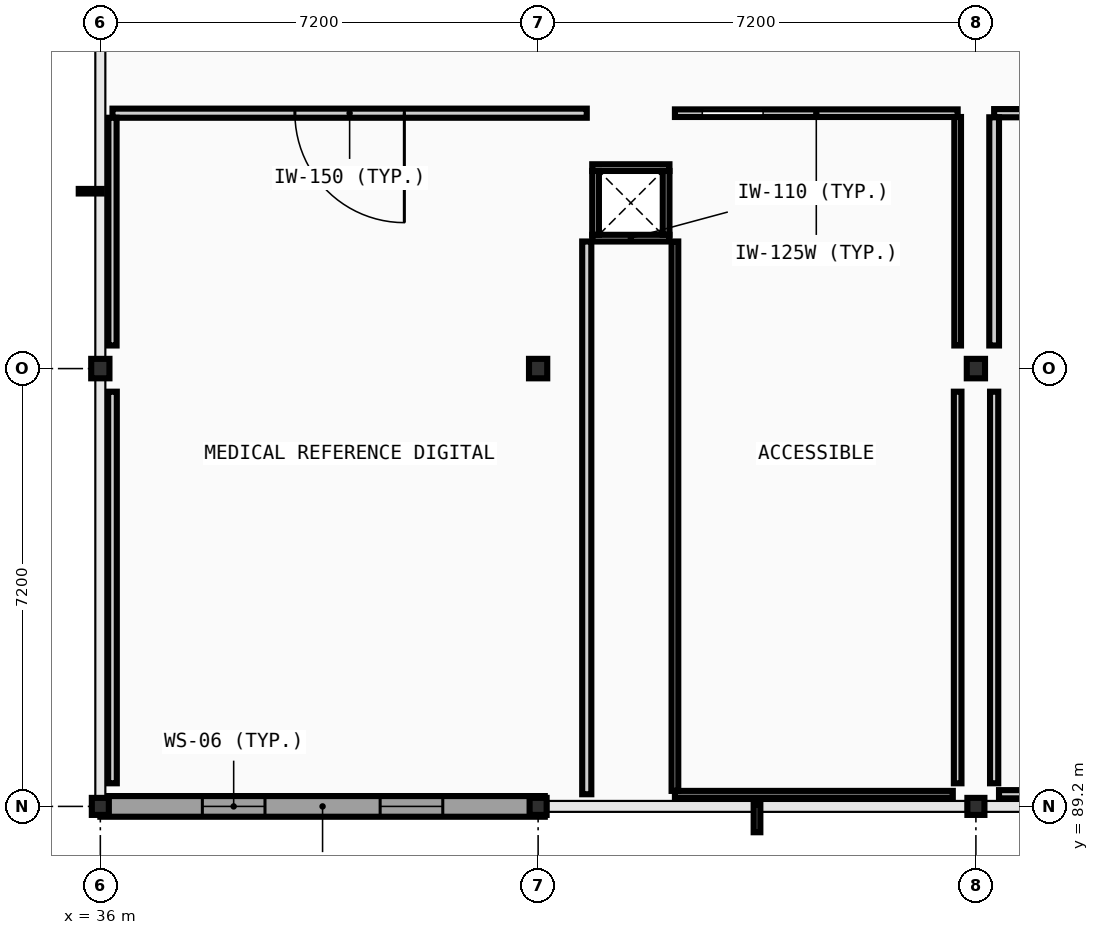
"""IFC4 building model, lengths in metres.
Left out: names, types, materials, properties, quantities, classifications, styles, units other than length and angle.
Written with IfcOpenShell. Run it as: python <this file> out.ifc"""

import sys

from ifc_helpers import new_model, si_unit, direction, frame, frame_2d, origin, origin_2d, place, context, subcontext, project, spatial, rectangle, i_section, extrude, element, fill, save


model = new_model("IFC4")
c1 = context("Model", 3, precision=1e-05, world=origin(), true_north=direction((0.0, 1.0)))
c2 = subcontext(c1, "Body", "Model", "MODEL_VIEW")
j1 = project(units=[si_unit("LENGTHUNIT", "METRE"), si_unit("PLANEANGLEUNIT", "RADIAN")], contexts=[c1])
p1 = place(None, origin())
s1 = spatial("IfcSite", under=j1, at=p1, CompositionType="ELEMENT")
p2 = place(p1, origin())
s2 = spatial("IfcBuilding", under=s1, at=p2, CompositionType="ELEMENT")
p3 = place(p2, frame((0.0, 0.0, 18.4)))
s3 = spatial("IfcBuildingStorey", under=s2, at=p3, CompositionType="ELEMENT", Elevation=18.4)
p4 = place(p3, frame((36.0, 89.2, 0.0), z_axis=(0.0, 0.0, 1.0), x_axis=(1.0, 0.0, 0.0)))
e1 = element("IfcColumn", 1, at=p4, inside=s3, PredefinedType="COLUMN", context=c2, shape_type="SweptSolid", body=[
    extrude(i_section(OverallWidth=0.28, OverallDepth=0.28, WebThickness=0.01, FlangeThickness=0.018, FilletRadius=0.024, at=origin_2d()), origin(), (0.0, 0.0, 1.0), 4.4),
])
p5 = place(p3, frame((36.0, 96.4, 0.0), z_axis=(0.0, 0.0, 1.0), x_axis=(1.0, 0.0, 0.0)))
e2 = element("IfcColumn", 2, at=p5, inside=s3, PredefinedType="COLUMN", context=c2, shape_type="SweptSolid", body=[
    extrude(i_section(OverallWidth=0.3, OverallDepth=0.32, WebThickness=0.011, FlangeThickness=0.021, FilletRadius=0.027, at=origin_2d()), origin(), (0.0, 0.0, 1.0), 4.4),
])
p6 = place(p3, frame((43.2, 89.2, 0.0), z_axis=(0.0, 0.0, 1.0), x_axis=(1.0, 0.0, 0.0)))
e3 = element("IfcColumn", 3, at=p6, inside=s3, PredefinedType="COLUMN", context=c2, shape_type="SweptSolid", body=[
    extrude(i_section(OverallWidth=0.28, OverallDepth=0.28, WebThickness=0.01, FlangeThickness=0.018, FilletRadius=0.024, at=origin_2d()), origin(), (0.0, 0.0, 1.0), 4.4),
])
p7 = place(p3, frame((43.2, 96.4, 0.0), z_axis=(0.0, 0.0, 1.0), x_axis=(1.0, 0.0, 0.0)))
e4 = element("IfcColumn", 4, at=p7, inside=s3, PredefinedType="COLUMN", context=c2, shape_type="SweptSolid", body=[
    extrude(i_section(OverallWidth=0.3, OverallDepth=0.32, WebThickness=0.011, FlangeThickness=0.021, FilletRadius=0.027, at=origin_2d()), origin(), (0.0, 0.0, 1.0), 4.4),
])
p8 = place(p3, frame((50.4, 89.2, 0.0), z_axis=(0.0, 0.0, 1.0), x_axis=(1.0, 0.0, 0.0)))
e5 = element("IfcColumn", 5, at=p8, inside=s3, PredefinedType="COLUMN", context=c2, shape_type="SweptSolid", body=[
    extrude(i_section(OverallWidth=0.28, OverallDepth=0.28, WebThickness=0.01, FlangeThickness=0.018, FilletRadius=0.024, at=origin_2d()), origin(), (0.0, 0.0, 1.0), 4.4),
])
p9 = place(p3, frame((50.4, 96.4, 0.0), z_axis=(0.0, 0.0, 1.0), x_axis=(1.0, 0.0, 0.0)))
e6 = element("IfcColumn", 6, at=p9, inside=s3, PredefinedType="COLUMN", context=c2, shape_type="SweptSolid", body=[
    extrude(i_section(OverallWidth=0.3, OverallDepth=0.32, WebThickness=0.011, FlangeThickness=0.021, FilletRadius=0.027, at=origin_2d()), origin(), (0.0, 0.0, 1.0), 4.4),
])
p10 = place(p3, frame((36.0, 89.2, 0.0), z_axis=(0.0, 0.0, 1.0), x_axis=(1.0, 0.0, 0.0)))
e7 = element("IfcWall", 7, at=p10, inside=s3, PredefinedType="STANDARD", context=c2, shape_type="SweptSolid", body=[
    extrude(rectangle(XDim=7.31, YDim=0.34, at=frame_2d((3.655, 0.0))), origin(), (0.0, 0.0, 1.0), 3.94),
])
p11 = place(p10, frame((1.678, 0.0, 0.95)))
e8 = element("IfcOpeningElement", 8, at=p11, cuts=e7, PredefinedType="OPENING", context=c2, shape_type="SweptSolid", body=[
    extrude(rectangle(XDim=1.03, YDim=1.26, at=frame_2d((0.515, 0.63))), frame((0.0, 0.18, 0.0), z_axis=(0.0, -1.0, 0.0), x_axis=(1.0, 0.0, 0.0)), (0.0, 0.0, 1.0), 0.36),
])
p12 = place(p10, frame((4.602, 0.0, 0.95)))
e9 = element("IfcOpeningElement", 9, at=p12, cuts=e7, PredefinedType="OPENING", context=c2, shape_type="SweptSolid", body=[
    extrude(rectangle(XDim=1.03, YDim=1.26, at=frame_2d((0.515, 0.63))), frame((0.0, 0.18, 0.0), z_axis=(0.0, -1.0, 0.0), x_axis=(1.0, 0.0, 0.0)), (0.0, 0.0, 1.0), 0.36),
])
for number, where, z_axis, x_axis in (
    (10, (44.09, 98.545, 0.0), (0.0, 0.0, 1.0), (1.0, 0.0, 0.0)),
    (11, (44.09, 99.705, 0.0), (0.0, 0.0, 1.0), (1.0, 0.0, 0.0)),
):
    element("IfcWall", number, at=place(p3, frame(where, z_axis=z_axis, x_axis=x_axis)), inside=s3, PredefinedType="PARTITIONING", context=c2, shape_type="SweptSolid", body=[
        extrude(rectangle(XDim=1.27, YDim=0.11, at=frame_2d((0.635, 0.0))), origin(), (0.0, 0.0, 1.0), 4.215),
    ])
for number, where, z_axis, x_axis in (
    (12, (44.145, 98.6, 0.0), (0.0, 0.0, 1.0), (0.0, 1.0, 0.0)),
    (13, (45.305, 98.6, 0.0), (0.0, 0.0, 1.0), (0.0, 1.0, 0.0)),
):
    element("IfcWall", number, at=place(p3, frame(where, z_axis=z_axis, x_axis=x_axis)), inside=s3, PredefinedType="PARTITIONING", context=c2, shape_type="SweptSolid", body=[
        extrude(rectangle(XDim=1.05, YDim=0.11, at=frame_2d((0.525, 0.0))), origin(), (0.0, 0.0, 1.0), 4.215),
    ])
p13 = place(p3, frame((45.45, 89.4, 0.0), z_axis=(0.0, 0.0, 1.0), x_axis=(1.0, 0.0, 0.0)))
e14 = element("IfcWall", 14, at=p13, inside=s3, PredefinedType="PARTITIONING", context=c2, shape_type="SweptSolid", body=[
    extrude(rectangle(XDim=4.57, YDim=0.11, at=frame_2d((2.285, 0.0))), origin(), (0.0, 0.0, 1.0), 3.94),
])
p14 = place(p3, frame((50.78, 89.4, 0.0), z_axis=(0.0, 0.0, 1.0), x_axis=(1.0, 0.0, 0.0)))
e15 = element("IfcWall", 15, at=p14, inside=s3, PredefinedType="PARTITIONING", context=c2, shape_type="SweptSolid", body=[
    extrude(rectangle(XDim=6.44, YDim=0.135, at=frame_2d((3.22, 0.0))), origin(), (0.0, 0.0, 1.0), 3.94),
])
p15 = place(p3, frame((36.2, 100.6, 0.0), z_axis=(0.0, 0.0, 1.0), x_axis=(1.0, 0.0, 0.0)))
e16 = element("IfcWall", 16, at=p15, inside=s3, PredefinedType="PARTITIONING", context=c2, shape_type="SweptSolid", body=[
    extrude(rectangle(XDim=7.8, YDim=0.15, at=frame_2d((3.9, 0.0))), origin(), (0.0, 0.0, 1.0), 4.215),
])
p16 = place(p15, frame((3.0, 0.0, 0.0)))
e17 = element("IfcOpeningElement", 17, at=p16, cuts=e16, PredefinedType="OPENING", context=c2, shape_type="SweptSolid", body=[
    extrude(rectangle(XDim=1.8, YDim=2.3, at=frame_2d((0.9, 1.15))), frame((0.0, 0.085, 0.0), z_axis=(0.0, -1.0, 0.0), x_axis=(1.0, 0.0, 0.0)), (0.0, 0.0, 1.0), 0.17),
])
p17 = place(p3, frame((45.45, 100.6, 0.0), z_axis=(0.0, 0.0, 1.0), x_axis=(1.0, 0.0, 0.0)))
e18 = element("IfcWall", 18, at=p17, inside=s3, PredefinedType="PARTITIONING", context=c2, shape_type="SweptSolid", body=[
    extrude(rectangle(XDim=4.65, YDim=0.125, at=frame_2d((2.325, 0.0))), origin(), (0.0, 0.0, 1.0), 4.215),
])
p18 = place(p17, frame((0.45, 0.0, 0.0)))
e19 = element("IfcOpeningElement", 19, at=p18, cuts=e18, PredefinedType="OPENING", context=c2, shape_type="SweptSolid", body=[
    extrude(rectangle(XDim=1.0, YDim=2.1, at=frame_2d((0.5, 1.05))), frame((0.0, 0.073, 0.0), z_axis=(0.0, -1.0, 0.0), x_axis=(1.0, 0.0, 0.0)), (0.0, 0.0, 1.0), 0.145),
])
p19 = place(p3, frame((50.7, 100.6, 0.0), z_axis=(0.0, 0.0, 1.0), x_axis=(1.0, 0.0, 0.0)))
e20 = element("IfcWall", 20, at=p19, inside=s3, PredefinedType="PARTITIONING", context=c2, shape_type="SweptSolid", body=[
    extrude(rectangle(XDim=13.9, YDim=0.135, at=frame_2d((6.95, 0.0))), origin(), (0.0, 0.0, 1.0), 4.215),
])
p20 = place(p19, frame((2.28, 0.0, 0.0)))
e21 = element("IfcOpeningElement", 21, at=p20, cuts=e20, PredefinedType="OPENING", context=c2, shape_type="SweptSolid", body=[
    extrude(rectangle(XDim=1.14, YDim=2.068, at=frame_2d((0.57, 1.034))), frame((0.0, 0.078, 0.0), z_axis=(0.0, -1.0, 0.0), x_axis=(1.0, 0.0, 0.0)), (0.0, 0.0, 1.0), 0.155),
])
p21 = place(p19, frame((9.217, 0.0, 0.0)))
e22 = element("IfcOpeningElement", 22, at=p21, cuts=e20, PredefinedType="OPENING", context=c2, shape_type="SweptSolid", body=[
    extrude(rectangle(XDim=1.166, YDim=2.068, at=frame_2d((0.583, 1.034))), frame((0.0, 0.078, 0.0), z_axis=(0.0, -1.0, 0.0), x_axis=(1.0, 0.0, 0.0)), (0.0, 0.0, 1.0), 0.155),
])
p22 = place(p3, frame((36.2, 89.58, 0.0), z_axis=(0.0, 0.0, 1.0), x_axis=(0.0, 1.0, 0.0)))
e23 = element("IfcWall", 23, at=p22, inside=s3, PredefinedType="PARTITIONING", context=c2, shape_type="SweptSolid", body=[
    extrude(rectangle(XDim=6.44, YDim=0.142, at=frame_2d((3.22, 0.0))), origin(), (0.0, 0.0, 1.0), 3.89),
])
p23 = place(p3, frame((36.2, 96.78, 0.0), z_axis=(0.0, 0.0, 1.0), x_axis=(0.0, 1.0, 0.0)))
e24 = element("IfcWall", 24, at=p23, inside=s3, PredefinedType="PARTITIONING", context=c2, shape_type="SweptSolid", body=[
    extrude(rectangle(XDim=3.745, YDim=0.135, at=frame_2d((1.873, 0.0))), origin(), (0.0, 0.0, 1.0), 3.9),
])
p24 = place(p3, frame((44.0, 89.4, 0.0), z_axis=(0.0, 0.0, 1.0), x_axis=(0.0, 1.0, 0.0)))
e25 = element("IfcWall", 25, at=p24, inside=s3, PredefinedType="PARTITIONING", context=c2, shape_type="SweptSolid", body=[
    extrude(rectangle(XDim=9.09, YDim=0.15, at=frame_2d((4.545, 0.0))), origin(), (0.0, 0.0, 1.0), 4.215),
])
p25 = place(p3, frame((45.45, 89.455, 0.0), z_axis=(0.0, 0.0, 1.0), x_axis=(0.0, 1.0, 0.0)))
e26 = element("IfcWall", 26, at=p25, inside=s3, PredefinedType="PARTITIONING", context=c2, shape_type="SweptSolid", body=[
    extrude(rectangle(XDim=9.035, YDim=0.11, at=frame_2d((4.518, 0.0))), origin(), (0.0, 0.0, 1.0), 3.96),
])
p26 = place(p3, frame((50.1, 89.58, 0.0), z_axis=(0.0, 0.0, 1.0), x_axis=(0.0, 1.0, 0.0)))
e27 = element("IfcWall", 27, at=p26, inside=s3, PredefinedType="PARTITIONING", context=c2, shape_type="SweptSolid", body=[
    extrude(rectangle(XDim=6.44, YDim=0.125, at=frame_2d((3.22, 0.0))), origin(), (0.0, 0.0, 1.0), 4.215),
])
p27 = place(p3, frame((50.1, 96.78, 0.0), z_axis=(0.0, 0.0, 1.0), x_axis=(0.0, 1.0, 0.0)))
e28 = element("IfcWall", 28, at=p27, inside=s3, PredefinedType="PARTITIONING", context=c2, shape_type="SweptSolid", body=[
    extrude(rectangle(XDim=3.758, YDim=0.11, at=frame_2d((1.879, 0.0))), origin(), (0.0, 0.0, 1.0), 4.215),
])
p28 = place(p3, frame((50.7, 89.58, 0.0), z_axis=(0.0, 0.0, 1.0), x_axis=(0.0, 1.0, 0.0)))
e29 = element("IfcWall", 29, at=p28, inside=s3, PredefinedType="PARTITIONING", context=c2, shape_type="SweptSolid", body=[
    extrude(rectangle(XDim=6.44, YDim=0.135, at=frame_2d((3.22, 0.0))), origin(), (0.0, 0.0, 1.0), 4.215),
])
p29 = place(p3, frame((50.7, 96.78, 0.0), z_axis=(0.0, 0.0, 1.0), x_axis=(0.0, 1.0, 0.0)))
e30 = element("IfcWall", 30, at=p29, inside=s3, PredefinedType="PARTITIONING", context=c2, shape_type="SweptSolid", body=[
    extrude(rectangle(XDim=3.752, YDim=0.16, at=frame_2d((1.876, 0.0))), origin(), (0.0, 0.0, 1.0), 3.91),
])
p30 = place(p11, origin())
e31 = element("IfcWindow", 31, at=p30, inside=s3, PartitioningType="SINGLE_PANEL", PredefinedType="WINDOW", context=c2, shape_type="SweptSolid", body=[
    extrude(rectangle(XDim=1.03, YDim=1.26, at=frame_2d((0.515, 0.63))), frame((0.0, 0.03, 0.0), z_axis=(0.0, -1.0, 0.0), x_axis=(1.0, 0.0, 0.0)), (0.0, 0.0, 1.0), 0.06),
])
fill(e8, e31)
p31 = place(p12, origin())
e32 = element("IfcWindow", 32, at=p31, inside=s3, PartitioningType="SINGLE_PANEL", PredefinedType="WINDOW", context=c2, shape_type="SweptSolid", body=[
    extrude(rectangle(XDim=1.03, YDim=1.26, at=frame_2d((0.515, 0.63))), frame((0.0, 0.03, 0.0), z_axis=(0.0, -1.0, 0.0), x_axis=(1.0, 0.0, 0.0)), (0.0, 0.0, 1.0), 0.06),
])
fill(e9, e32)
p32 = place(p18, origin())
e33 = element("IfcDoor", 33, at=p32, inside=s3, OperationType="SLIDING_TO_LEFT", PredefinedType="DOOR", context=c2, shape_type="SweptSolid", body=[
    extrude(rectangle(XDim=1.0, YDim=2.1, at=frame_2d((0.5, 1.05))), frame((0.0, 0.025, 0.0), z_axis=(0.0, -1.0, 0.0), x_axis=(1.0, 0.0, 0.0)), (0.0, 0.0, 1.0), 0.05),
])
fill(e19, e33)
p33 = place(p16, origin())
e34 = element("IfcDoor", 34, at=p33, inside=s3, OperationType="DOUBLE_DOOR_SINGLE_SWING", PredefinedType="DOOR", context=c2, shape_type="SweptSolid", body=[
    extrude(rectangle(XDim=1.8, YDim=2.3, at=frame_2d((0.9, 1.15))), frame((0.0, 0.025, 0.0), z_axis=(0.0, -1.0, 0.0), x_axis=(1.0, 0.0, 0.0)), (0.0, 0.0, 1.0), 0.05),
])
fill(e17, e34)
save(model, sys.argv[1])
